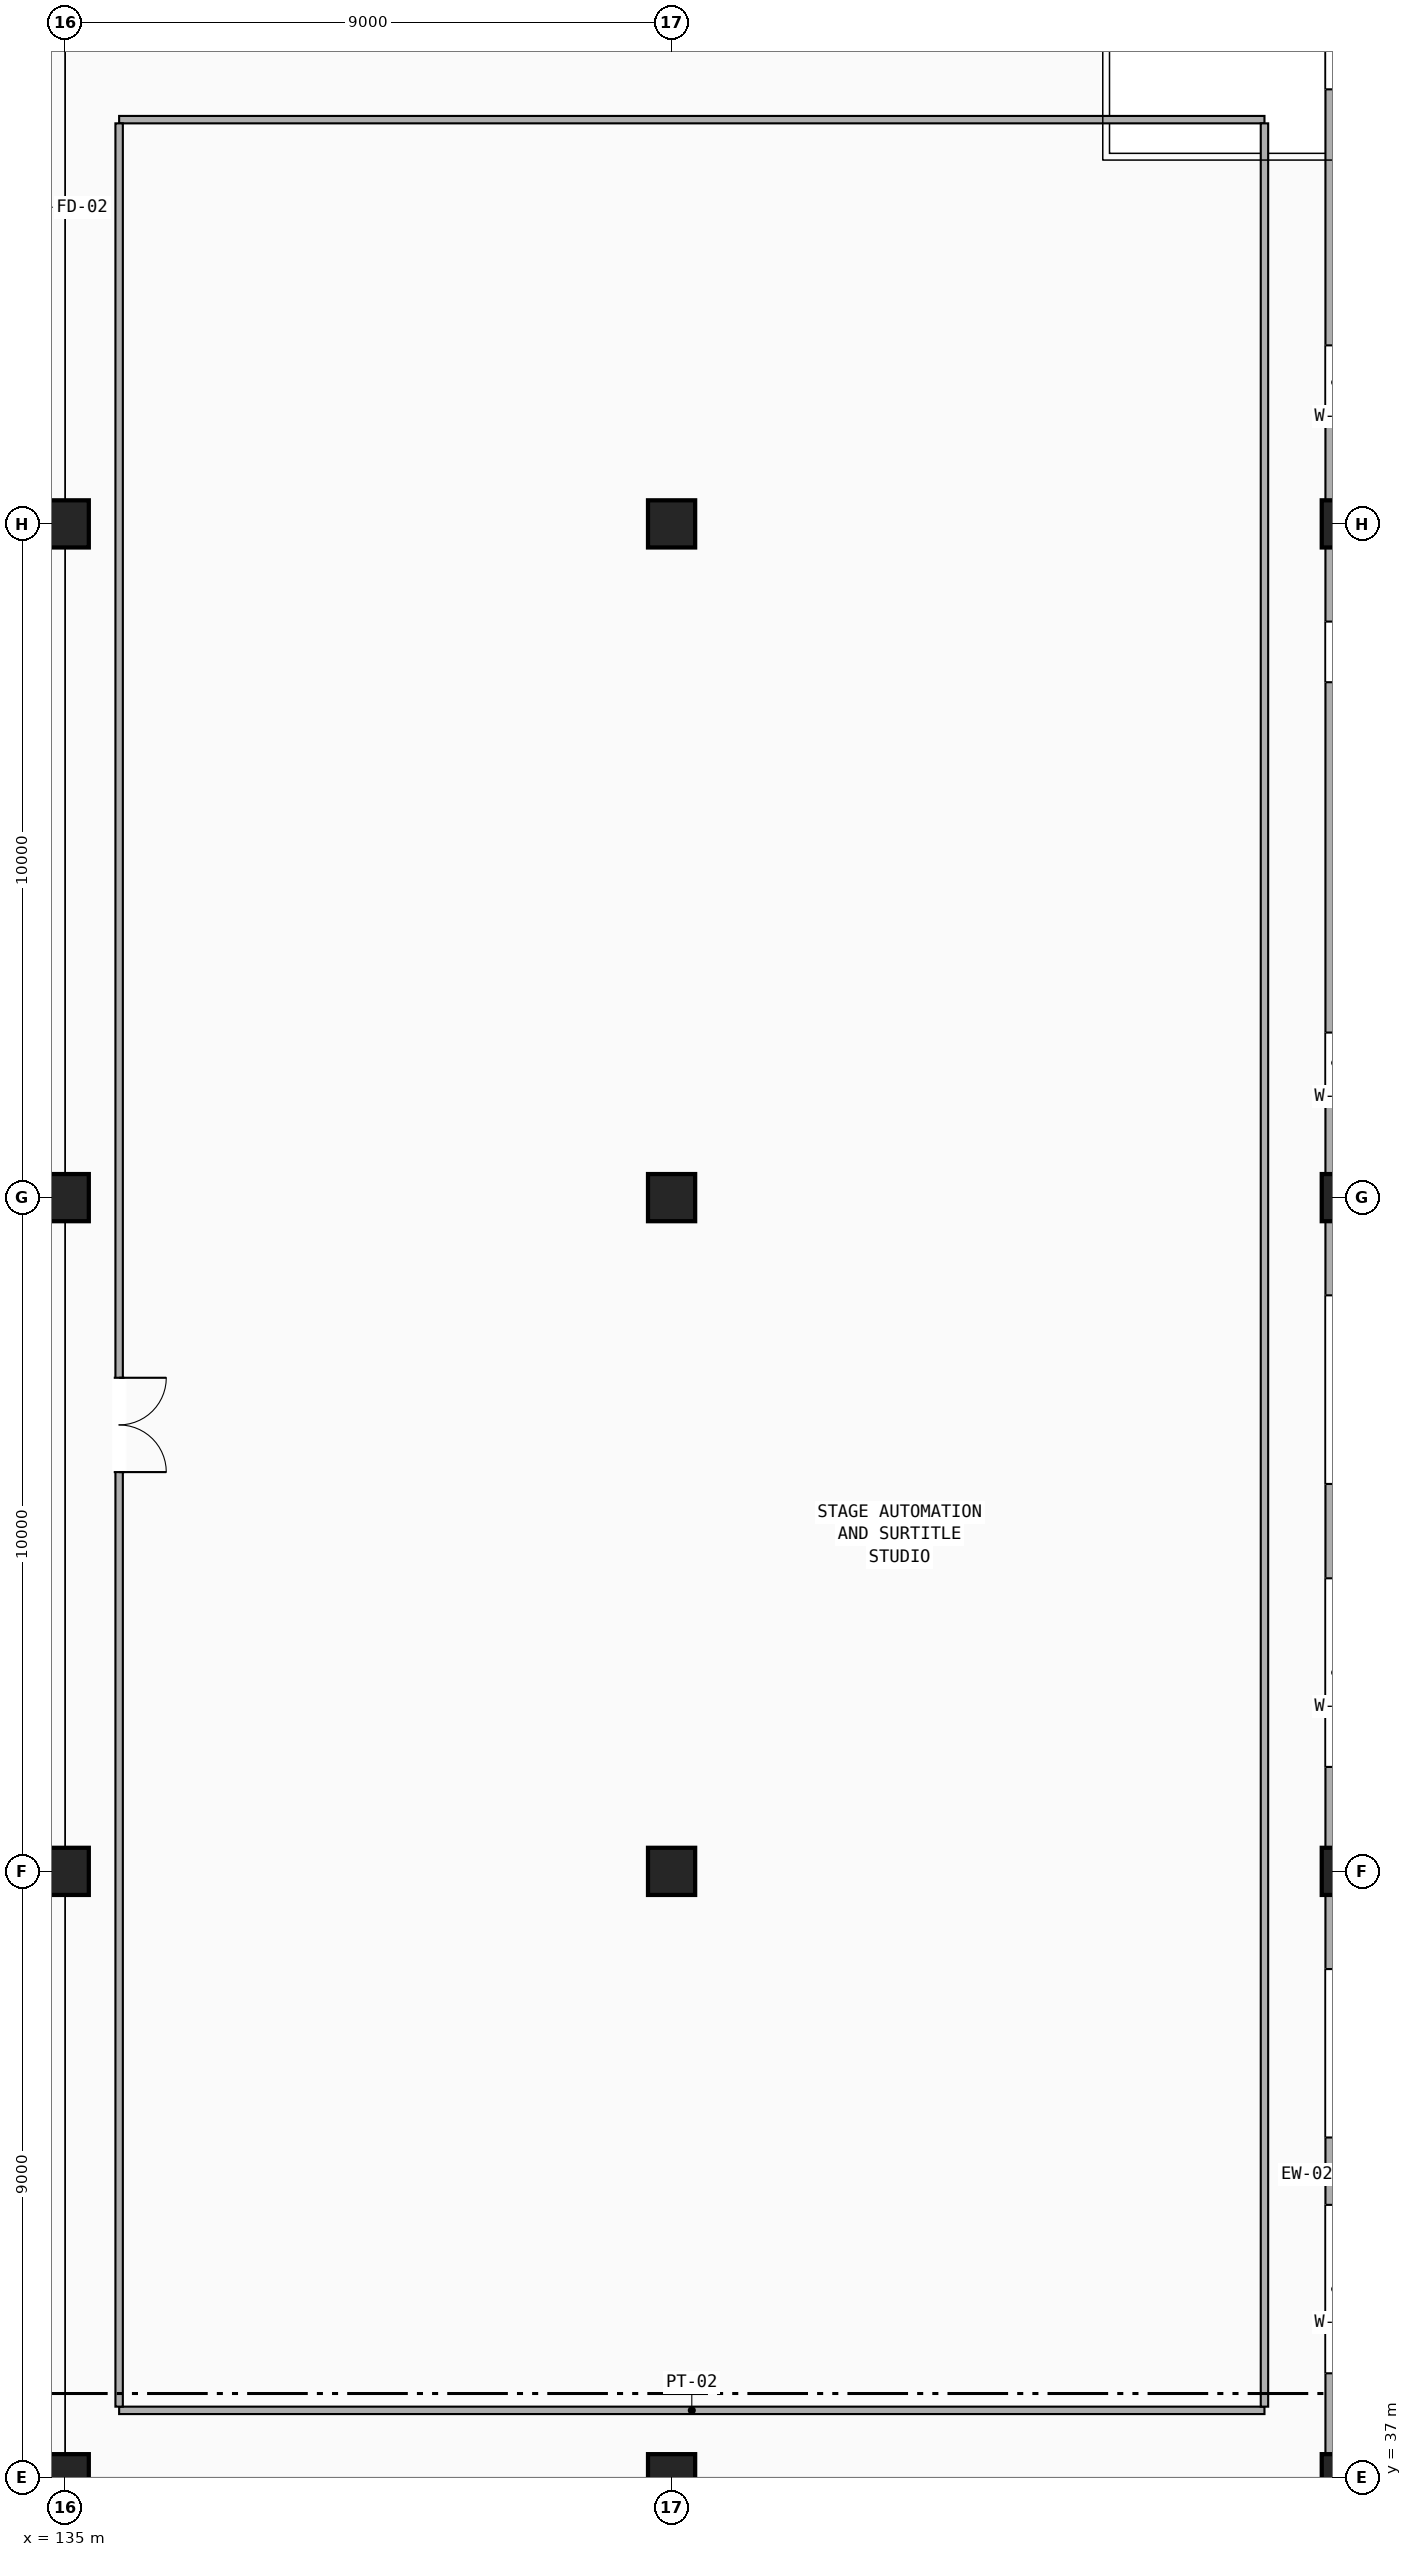
"""IFC4 building model, lengths in metres.
Left out: names, types, materials, properties, quantities, classifications, styles, units other than length and angle.
Written with IfcOpenShell. Run it as: python <this file> out.ifc"""

import sys

from ifc_helpers import new_model, si_unit, direction, frame, frame_2d, origin, origin_2d, place, context, subcontext, project, spatial, rectangle, extrude, element, fill, save


model = new_model("IFC4")
c1 = context("Model", 3, precision=1e-05, world=origin(), true_north=direction((0.0, 1.0)))
c2 = subcontext(c1, "Body", "Model", "MODEL_VIEW")
j1 = project(units=[si_unit("LENGTHUNIT", "METRE"), si_unit("PLANEANGLEUNIT", "RADIAN")], contexts=[c1])
p1 = place(None, origin())
s1 = spatial("IfcSite", under=j1, at=p1, CompositionType="ELEMENT")
p2 = place(p1, origin())
s2 = spatial("IfcBuilding", under=s1, at=p2, CompositionType="ELEMENT")
p3 = place(p2, frame((0.0, 0.0, 13.6)))
s3 = spatial("IfcBuildingStorey", under=s2, at=p3, CompositionType="ELEMENT", Elevation=13.6)
for number, where, z_axis, x_axis in (
    (1, (135.0, 37.0, 0.0), (0.0, 0.0, 1.0), (1.0, 0.0, 0.0)),
    (2, (135.0, 46.0, 0.0), (0.0, 0.0, 1.0), (1.0, 0.0, 0.0)),
    (3, (135.0, 56.0, 0.0), (0.0, 0.0, 1.0), (1.0, 0.0, 0.0)),
    (4, (135.0, 66.0, 0.0), (0.0, 0.0, 1.0), (1.0, 0.0, 0.0)),
    (5, (144.0, 37.0, 0.0), (0.0, 0.0, 1.0), (1.0, 0.0, 0.0)),
    (6, (144.0, 46.0, 0.0), (0.0, 0.0, 1.0), (1.0, 0.0, 0.0)),
    (7, (144.0, 56.0, 0.0), (0.0, 0.0, 1.0), (1.0, 0.0, 0.0)),
    (8, (144.0, 66.0, 0.0), (0.0, 0.0, 1.0), (1.0, 0.0, 0.0)),
    (9, (154.0, 37.0, 0.0), (0.0, 0.0, 1.0), (1.0, 0.0, 0.0)),
    (10, (154.0, 46.0, 0.0), (0.0, 0.0, 1.0), (1.0, 0.0, 0.0)),
    (11, (154.0, 56.0, 0.0), (0.0, 0.0, 1.0), (1.0, 0.0, 0.0)),
    (12, (154.0, 66.0, 0.0), (0.0, 0.0, 1.0), (1.0, 0.0, 0.0)),
):
    element("IfcColumn", number, at=place(p3, frame(where, z_axis=z_axis, x_axis=x_axis)), inside=s3, PredefinedType="COLUMN", context=c2, shape_type="SweptSolid", body=[
        extrude(rectangle(XDim=0.7, YDim=0.7, at=origin_2d()), origin(), (0.0, 0.0, 1.0), 4.08),
    ])
p4 = place(p3, frame((153.85, 37.35, 0.0), z_axis=(0.0, 0.0, 1.0), x_axis=(0.0, 1.0, 0.0)))
e13 = element("IfcWall", 13, at=p4, inside=s3, PredefinedType="STANDARD", context=c2, shape_type="SweptSolid", body=[
    extrude(rectangle(XDim=8.3, YDim=0.29, at=frame_2d((4.15, 0.0))), origin(), (0.0, 0.0, 1.0), 3.277),
])
p5 = place(p4, frame((1.2, 0.0, 0.9)))
e14 = element("IfcOpeningElement", 14, at=p5, cuts=e13, PredefinedType="OPENING", context=c2, shape_type="SweptSolid", body=[
    extrude(rectangle(XDim=2.5, YDim=1.8, at=frame_2d((1.25, 0.9))), frame((0.0, 0.155, 0.0), z_axis=(0.0, -1.0, 0.0), x_axis=(1.0, 0.0, 0.0)), (0.0, 0.0, 1.0), 0.31),
])
p6 = place(p4, frame((4.7, 0.0, 0.9)))
e15 = element("IfcOpeningElement", 15, at=p6, cuts=e13, PredefinedType="OPENING", context=c2, shape_type="SweptSolid", body=[
    extrude(rectangle(XDim=2.5, YDim=1.8, at=frame_2d((1.25, 0.9))), frame((0.0, 0.155, 0.0), z_axis=(0.0, -1.0, 0.0), x_axis=(1.0, 0.0, 0.0)), (0.0, 0.0, 1.0), 0.31),
])
p7 = place(p3, frame((153.85, 46.35, 0.0), z_axis=(0.0, 0.0, 1.0), x_axis=(0.0, 1.0, 0.0)))
e16 = element("IfcWall", 16, at=p7, inside=s3, PredefinedType="STANDARD", context=c2, shape_type="SweptSolid", body=[
    extrude(rectangle(XDim=9.3, YDim=0.29, at=frame_2d((4.65, 0.0))), origin(), (0.0, 0.0, 1.0), 3.277),
])
p8 = place(p7, frame((1.2, 0.0, 0.9)))
e17 = element("IfcOpeningElement", 17, at=p8, cuts=e16, PredefinedType="OPENING", context=c2, shape_type="SweptSolid", body=[
    extrude(rectangle(XDim=2.8, YDim=1.9, at=frame_2d((1.4, 0.95))), frame((0.0, 0.155, 0.0), z_axis=(0.0, -1.0, 0.0), x_axis=(1.0, 0.0, 0.0)), (0.0, 0.0, 1.0), 0.31),
])
p9 = place(p7, frame((5.4, 0.0, 0.9)))
e18 = element("IfcOpeningElement", 18, at=p9, cuts=e16, PredefinedType="OPENING", context=c2, shape_type="SweptSolid", body=[
    extrude(rectangle(XDim=2.8, YDim=1.9, at=frame_2d((1.4, 0.95))), frame((0.0, 0.155, 0.0), z_axis=(0.0, -1.0, 0.0), x_axis=(1.0, 0.0, 0.0)), (0.0, 0.0, 1.0), 0.31),
])
p10 = place(p3, frame((153.85, 56.35, 0.0), z_axis=(0.0, 0.0, 1.0), x_axis=(0.0, 1.0, 0.0)))
e19 = element("IfcWall", 19, at=p10, inside=s3, PredefinedType="STANDARD", context=c2, shape_type="SweptSolid", body=[
    extrude(rectangle(XDim=9.3, YDim=0.29, at=frame_2d((4.65, 0.0))), origin(), (0.0, 0.0, 1.0), 3.277),
])
p11 = place(p10, frame((1.2, 0.0, 0.9)))
e20 = element("IfcOpeningElement", 20, at=p11, cuts=e19, PredefinedType="OPENING", context=c2, shape_type="SweptSolid", body=[
    extrude(rectangle(XDim=0.9, YDim=1.5, at=frame_2d((0.45, 0.75))), frame((0.0, 0.155, 0.0), z_axis=(0.0, -1.0, 0.0), x_axis=(1.0, 0.0, 0.0)), (0.0, 0.0, 1.0), 0.31),
])
p12 = place(p10, frame((7.3, 0.0, 0.9)))
e21 = element("IfcOpeningElement", 21, at=p12, cuts=e19, PredefinedType="OPENING", context=c2, shape_type="SweptSolid", body=[
    extrude(rectangle(XDim=0.9, YDim=1.5, at=frame_2d((0.45, 0.75))), frame((0.0, 0.155, 0.0), z_axis=(0.0, -1.0, 0.0), x_axis=(1.0, 0.0, 0.0)), (0.0, 0.0, 1.0), 0.31),
])
p13 = place(p3, frame((153.85, 66.35, 0.0), z_axis=(0.0, 0.0, 1.0), x_axis=(0.0, 1.0, 0.0)))
e22 = element("IfcWall", 22, at=p13, inside=s3, PredefinedType="STANDARD", context=c2, shape_type="SweptSolid", body=[
    extrude(rectangle(XDim=8.3, YDim=0.29, at=frame_2d((4.15, 0.0))), origin(), (0.0, 0.0, 1.0), 3.277),
])
p14 = place(p13, frame((1.2, 0.0, 0.9)))
e23 = element("IfcOpeningElement", 23, at=p14, cuts=e22, PredefinedType="OPENING", context=c2, shape_type="SweptSolid", body=[
    extrude(rectangle(XDim=1.1, YDim=2.0, at=frame_2d((0.55, 1.0))), frame((0.0, 0.155, 0.0), z_axis=(0.0, -1.0, 0.0), x_axis=(1.0, 0.0, 0.0)), (0.0, 0.0, 1.0), 0.31),
])
p15 = place(p13, frame((6.1, 0.0, 0.9)))
e24 = element("IfcOpeningElement", 24, at=p15, cuts=e22, PredefinedType="OPENING", context=c2, shape_type="SweptSolid", body=[
    extrude(rectangle(XDim=1.1, YDim=2.0, at=frame_2d((0.55, 1.0))), frame((0.0, 0.155, 0.0), z_axis=(0.0, -1.0, 0.0), x_axis=(1.0, 0.0, 0.0)), (0.0, 0.0, 1.0), 0.31),
])
for number, where, z_axis, x_axis in (
    (25, (135.8, 38.0, 0.0), (0.0, 0.0, 1.0), (1.0, 0.0, 0.0)),
    (26, (135.8, 72.0, 0.0), (0.0, 0.0, 1.0), (1.0, 0.0, 0.0)),
):
    element("IfcWall", number, at=place(p3, frame(where, z_axis=z_axis, x_axis=x_axis)), inside=s3, PredefinedType="PARTITIONING", context=c2, shape_type="SweptSolid", body=[
        extrude(rectangle(XDim=17.0, YDim=0.11, at=frame_2d((8.5, 0.0))), origin(), (0.0, 0.0, 1.0), 3.84),
    ])
p16 = place(p3, frame((135.8, 38.055, 0.0), z_axis=(0.0, 0.0, 1.0), x_axis=(0.0, 1.0, 0.0)))
e27 = element("IfcWall", 27, at=p16, inside=s3, PredefinedType="PARTITIONING", context=c2, shape_type="SweptSolid", body=[
    extrude(rectangle(XDim=33.89, YDim=0.11, at=frame_2d((16.945, 0.0))), origin(), (0.0, 0.0, 1.0), 3.277),
])
p17 = place(p16, frame((13.871, 0.0, 0.0)))
e28 = element("IfcOpeningElement", 28, at=p17, cuts=e27, PredefinedType="OPENING", context=c2, shape_type="SweptSolid", body=[
    extrude(rectangle(XDim=1.4, YDim=2.2, at=frame_2d((0.7, 1.1))), frame((0.0, 0.065, 0.0), z_axis=(0.0, -1.0, 0.0), x_axis=(1.0, 0.0, 0.0)), (0.0, 0.0, 1.0), 0.13),
])
p18 = place(p3, frame((152.8, 38.055, 0.0), z_axis=(0.0, 0.0, 1.0), x_axis=(0.0, 1.0, 0.0)))
e29 = element("IfcWall", 29, at=p18, inside=s3, PredefinedType="PARTITIONING", context=c2, shape_type="SweptSolid", body=[
    extrude(rectangle(XDim=33.89, YDim=0.11, at=frame_2d((16.945, 0.0))), origin(), (0.0, 0.0, 1.0), 3.277),
])
p19 = place(p17, frame((1.4, 0.0, 0.0), z_axis=(0.0, 0.0, 1.0), x_axis=(-1.0, 0.0, 0.0)))
e30 = element("IfcDoor", 30, at=p19, inside=s3, OperationType="DOUBLE_DOOR_SINGLE_SWING", PredefinedType="DOOR", context=c2, shape_type="SweptSolid", body=[
    extrude(rectangle(XDim=1.4, YDim=2.2, at=frame_2d((0.7, 1.1))), frame((0.0, 0.025, 0.0), z_axis=(0.0, -1.0, 0.0), x_axis=(1.0, 0.0, 0.0)), (0.0, 0.0, 1.0), 0.05),
])
fill(e28, e30)
save(model, sys.argv[1])
